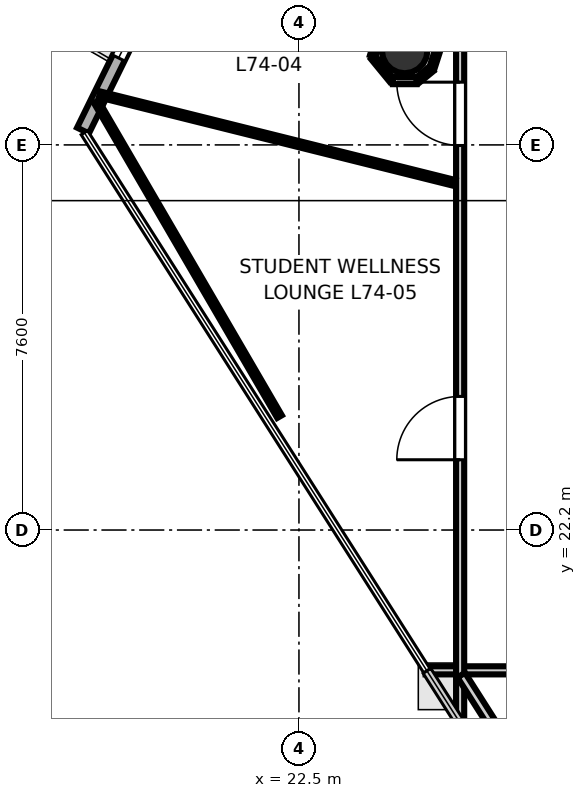
"""IFC4 building model, lengths in metres.
Left out: names, types, materials, properties, quantities, classifications, styles, units other than length and angle.
Written with IfcOpenShell. Run it as: python <this file> out.ifc"""

import sys

from ifc_helpers import new_model, si_unit, direction, frame, frame_2d, origin, origin_2d, place, context, subcontext, project, spatial, rectangle, hollow_circle, extrude, element, fill, save


model = new_model("IFC4")
c1 = context("Model", 3, precision=1e-05, world=origin(), true_north=direction((0.0, 1.0)))
c2 = subcontext(c1, "Body", "Model", "MODEL_VIEW")
j1 = project(units=[si_unit("LENGTHUNIT", "METRE"), si_unit("PLANEANGLEUNIT", "RADIAN")], contexts=[c1])
p1 = place(None, origin())
s1 = spatial("IfcSite", under=j1, at=p1, CompositionType="ELEMENT")
p2 = place(p1, origin())
s2 = spatial("IfcBuilding", under=s1, at=p2, CompositionType="ELEMENT")
p3 = place(p2, frame((0.0, 0.0, 288.0)))
s3 = spatial("IfcBuildingStorey", under=s2, at=p3, CompositionType="ELEMENT", Elevation=288.0)
p4 = place(p3, frame((24.587, 31.663, 0.0), z_axis=(0.0, 0.0, 1.0), x_axis=(1.0, 0.0, 0.0)))
e1 = element("IfcColumn", 1, at=p4, inside=s3, PredefinedType="COLUMN", context=c2, shape_type="SweptSolid", body=[
    extrude(hollow_circle(Radius=0.45, WallThickness=0.025, at=origin_2d()), origin(), (0.0, 0.0, 1.0), 3.7),
])
p5 = place(p3, frame((20.436, 34.563, 0.0), z_axis=(0.0, 0.0, 1.0), x_axis=(-0.440488239438, -0.897758381145, 0.0)))
e2 = element("IfcWall", 2, at=p5, inside=s3, PredefinedType="SOLIDWALL", context=c2, shape_type="SweptSolid", body=[
    extrude(rectangle(XDim=4.99, YDim=0.26, at=frame_2d((2.495, 0.0))), origin(), (0.0, 0.0, 1.0), 3.52),
])
p6 = place(p5, frame((1.595, 0.0, 0.85)))
e3 = element("IfcOpeningElement", 3, at=p6, cuts=e2, PredefinedType="OPENING", context=c2, shape_type="SweptSolid", body=[
    extrude(rectangle(XDim=1.8, YDim=2.1, at=frame_2d((0.9, 1.05))), frame((0.0, 0.14, 0.0), z_axis=(0.0, -1.0, 0.0), x_axis=(1.0, 0.0, 0.0)), (0.0, 0.0, 1.0), 0.28),
])
p7 = place(p3, frame((29.8, 19.431, 0.0), z_axis=(0.0, 0.0, 1.0), x_axis=(-1.0, 0.0, 0.0)))
e4 = element("IfcWall", 4, at=p7, inside=s3, PredefinedType="PARTITIONING", context=c2, shape_type="SweptSolid", body=[
    extrude(rectangle(XDim=4.801, YDim=0.16, at=frame_2d((2.4, 0.0))), origin(), (0.0, 0.0, 1.0), 2.84),
])
p8 = place(p7, frame((0.55, 0.0, 0.0)))
e5 = element("IfcOpeningElement", 5, at=p8, cuts=e4, PredefinedType="OPENING", context=c2, shape_type="SweptSolid", body=[
    extrude(rectangle(XDim=0.9, YDim=2.1, at=frame_2d((0.45, 1.05))), frame((0.0, 0.09, 0.0), z_axis=(0.0, -1.0, 0.0), x_axis=(1.0, 0.0, 0.0)), (0.0, 0.0, 1.0), 0.18),
])
p9 = place(p3, frame((25.681, 18.372, 0.0), z_axis=(0.0, 0.0, 1.0), x_axis=(0.0, 1.0, 0.0)))
e6 = element("IfcWall", 6, at=p9, inside=s3, PredefinedType="PARTITIONING", context=c2, shape_type="SweptSolid", body=[
    extrude(rectangle(XDim=14.178, YDim=0.16, at=frame_2d((7.089, 0.0))), origin(), (0.0, 0.0, 1.0), 2.84),
])
p10 = place(p9, frame((11.417, 0.0, 0.0)))
e7 = element("IfcOpeningElement", 7, at=p10, cuts=e6, PredefinedType="OPENING", context=c2, shape_type="SweptSolid", body=[
    extrude(rectangle(XDim=1.25, YDim=2.2, at=frame_2d((0.625, 1.1))), frame((0.0, 0.09, 0.0), z_axis=(0.0, -1.0, 0.0), x_axis=(1.0, 0.0, 0.0)), (0.0, 0.0, 1.0), 0.18),
])
p11 = place(p9, frame((5.215, 0.0, 0.0)))
e8 = element("IfcOpeningElement", 8, at=p11, cuts=e6, PredefinedType="OPENING", context=c2, shape_type="SweptSolid", body=[
    extrude(rectangle(XDim=1.25, YDim=2.2, at=frame_2d((0.625, 1.1))), frame((0.0, 0.09, 0.0), z_axis=(0.0, -1.0, 0.0), x_axis=(1.0, 0.0, 0.0)), (0.0, 0.0, 1.0), 0.18),
])
p12 = place(p3, frame((29.231, 13.794, 0.0), z_axis=(0.0, 0.0, 1.0), x_axis=(-0.5370149386, 0.843572732916, 0.0)))
e9 = element("IfcWall", 9, at=p12, inside=s3, PredefinedType="PLUMBINGWALL", context=c2, shape_type="SweptSolid", body=[
    extrude(rectangle(XDim=6.57, YDim=0.175, at=frame_2d((3.285, 0.0))), origin(), (0.0, 0.0, 1.0), 2.84),
])
p13 = place(p3, frame((24.126, 32.103, 0.0), z_axis=(0.0, 0.0, 1.0), x_axis=(-0.290384423064, -0.956910072495, 0.0)))
e10 = element("IfcWall", 10, at=p13, inside=s3, PredefinedType="PARTITIONING", context=c2, shape_type="SweptSolid", body=[
    extrude(rectangle(XDim=0.575, YDim=0.12, at=frame_2d((0.288, 0.0))), origin(), (0.0, 0.0, 1.0), 2.84),
])
p14 = place(p3, frame((23.965, 31.524, 0.0), z_axis=(0.0, 0.0, 1.0), x_axis=(0.634277575631, -0.77310539841, 0.0)))
e11 = element("IfcWall", 11, at=p14, inside=s3, PredefinedType="PARTITIONING", context=c2, shape_type="SweptSolid", body=[
    extrude(rectangle(XDim=0.575, YDim=0.105, at=frame_2d((0.288, 0.0))), origin(), (0.0, 0.0, 1.0), 2.84),
])
p15 = place(p3, frame((24.354, 31.068, 0.0), z_axis=(0.0, 0.0, 1.0), x_axis=(1.0, 0.0, 0.0)))
e12 = element("IfcWall", 12, at=p15, inside=s3, PredefinedType="PARTITIONING", context=c2, shape_type="SweptSolid", body=[
    extrude(rectangle(XDim=0.467, YDim=0.14, at=frame_2d((0.233, 0.0))), origin(), (0.0, 0.0, 1.0), 2.84),
])
p16 = place(p3, frame((24.84, 31.075, 0.0), z_axis=(0.0, 0.0, 1.0), x_axis=(0.773281307259, 0.634063103992, 0.0)))
e13 = element("IfcWall", 13, at=p16, inside=s3, PredefinedType="PARTITIONING", context=c2, shape_type="SweptSolid", body=[
    extrude(rectangle(XDim=0.354, YDim=0.12, at=frame_2d((0.177, 0.0))), origin(), (0.0, 0.0, 1.0), 2.84),
])
p17 = place(p3, frame((25.124, 31.315, 0.0), z_axis=(0.0, 0.0, 1.0), x_axis=(0.306761714687, 0.951786347035, 0.0)))
e14 = element("IfcWall", 14, at=p17, inside=s3, PredefinedType="PARTITIONING", context=c2, shape_type="SweptSolid", body=[
    extrude(rectangle(XDim=0.325, YDim=0.105, at=frame_2d((0.163, 0.0))), origin(), (0.0, 0.0, 1.0), 2.84),
])
p18 = place(p3, frame((25.577, 29.048, 0.0), z_axis=(0.0, 0.0, 1.0), x_axis=(-0.970297325038, 0.241915483226, 0.0)))
e15 = element("IfcWall", 15, at=p18, inside=s3, PredefinedType="PARTITIONING", context=c2, shape_type="SweptSolid", body=[
    extrude(rectangle(XDim=7.226, YDim=0.12, at=frame_2d((3.613, 0.0))), origin(), (0.0, 0.0, 1.0), 2.84),
])
p19 = place(p3, frame((22.117, 24.438, 0.0), z_axis=(0.0, 0.0, 1.0), x_axis=(-0.50301807404, 0.864275891825, 0.0)))
e16 = element("IfcWall", 16, at=p19, inside=s3, PredefinedType="PARTITIONING", context=c2, shape_type="SweptSolid", body=[
    extrude(rectangle(XDim=7.192, YDim=0.105, at=frame_2d((3.596, 0.0))), origin(), (0.0, 0.0, 1.0), 2.84),
])
p20 = place(p10, origin())
e17 = element("IfcDoor", 17, at=p20, inside=s3, OperationType="SINGLE_SWING_RIGHT", PredefinedType="DOOR", context=c2, shape_type="SweptSolid", body=[
    extrude(rectangle(XDim=1.25, YDim=2.2, at=frame_2d((0.625, 1.1))), frame((0.0, 0.025, 0.0), z_axis=(0.0, -1.0, 0.0), x_axis=(1.0, 0.0, 0.0)), (0.0, 0.0, 1.0), 0.05),
])
fill(e7, e17)
p21 = place(p11, origin())
e18 = element("IfcDoor", 18, at=p21, inside=s3, OperationType="SINGLE_SWING_LEFT", PredefinedType="DOOR", context=c2, shape_type="SweptSolid", body=[
    extrude(rectangle(XDim=1.25, YDim=2.2, at=frame_2d((0.625, 1.1))), frame((0.0, 0.025, 0.0), z_axis=(0.0, -1.0, 0.0), x_axis=(1.0, 0.0, 0.0)), (0.0, 0.0, 1.0), 0.05),
])
fill(e8, e18)
p22 = place(p6, origin())
e19 = element("IfcWindow", 19, at=p22, inside=s3, PartitioningType="SINGLE_PANEL", PredefinedType="WINDOW", context=c2, shape_type="SweptSolid", body=[
    extrude(rectangle(XDim=1.8, YDim=2.1, at=frame_2d((0.9, 1.05))), frame((0.0, 0.03, 0.0), z_axis=(0.0, -1.0, 0.0), x_axis=(1.0, 0.0, 0.0)), (0.0, 0.0, 1.0), 0.06),
])
fill(e3, e19)
save(model, sys.argv[1])
